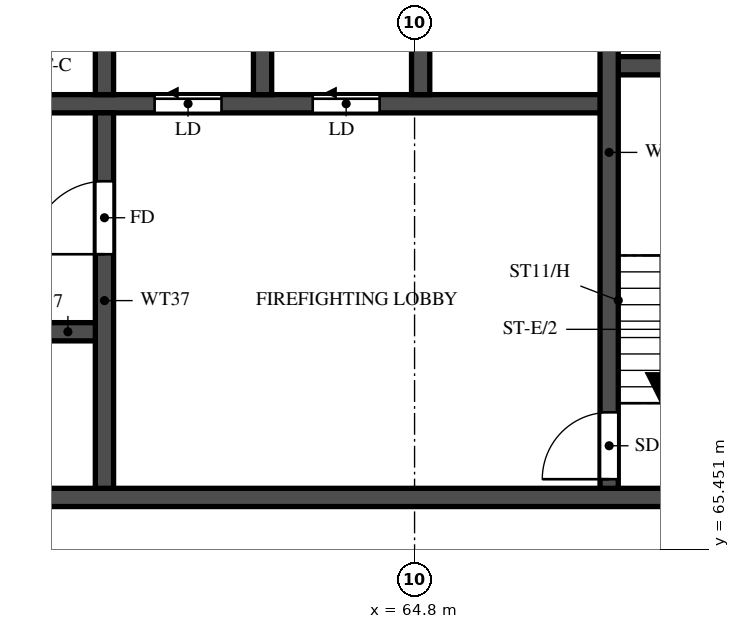
"""IFC4 building model, lengths in metres.
Left out: names, types, materials, properties, quantities, classifications, styles, units other than length and angle.
Written with IfcOpenShell. Run it as: python <this file> out.ifc"""

import sys

from ifc_helpers import new_model, si_unit, direction, frame, frame_2d, origin, place, context, subcontext, project, spatial, rectangle, extrude, element, fill, save


model = new_model("IFC4")
c1 = context("Model", 3, precision=1e-05, world=origin(), true_north=direction((0.0, 1.0)))
c2 = subcontext(c1, "Body", "Model", "MODEL_VIEW")
j1 = project(units=[si_unit("LENGTHUNIT", "METRE"), si_unit("PLANEANGLEUNIT", "RADIAN")], contexts=[c1])
p1 = place(None, origin())
s1 = spatial("IfcSite", under=j1, at=p1, CompositionType="ELEMENT")
p2 = place(p1, origin())
s2 = spatial("IfcBuilding", under=s1, at=p2, CompositionType="ELEMENT")
p3 = place(p2, frame((0.0, 0.0, 239.5)))
s3 = spatial("IfcBuildingStorey", under=s2, at=p3, CompositionType="ELEMENT", Elevation=239.5)
p4 = place(p3, frame((29.2, 66.3, 0.0), z_axis=(0.0, 0.0, 1.0), x_axis=(1.0, 0.0, 0.0)))
e1 = element("IfcWall", 1, at=p4, inside=s3, PredefinedType="SHEAR", context=c2, shape_type="SweptSolid", body=[
    extrude(rectangle(XDim=42.4, YDim=0.3, at=frame_2d((21.2, 0.0))), origin(), (0.0, 0.0, 1.0), 3.22),
])
p5 = place(p4, frame((1.425, 0.0, 0.0)))
e2 = element("IfcOpeningElement", 2, at=p5, cuts=e1, PredefinedType="OPENING", context=c2, shape_type="SweptSolid", body=[
    extrude(rectangle(XDim=1.1, YDim=2.1, at=frame_2d((0.55, 1.05))), frame((0.0, 0.16, 0.0), z_axis=(0.0, -1.0, 0.0), x_axis=(1.0, 0.0, 0.0)), (0.0, 0.0, 1.0), 0.32),
])
p6 = place(p4, frame((4.2, 0.0, 0.0)))
e3 = element("IfcOpeningElement", 3, at=p6, cuts=e1, PredefinedType="OPENING", context=c2, shape_type="SweptSolid", body=[
    extrude(rectangle(XDim=1.8, YDim=2.1, at=frame_2d((0.9, 1.05))), frame((0.0, 0.16, 0.0), z_axis=(0.0, -1.0, 0.0), x_axis=(1.0, 0.0, 0.0)), (0.0, 0.0, 1.0), 0.32),
])
p7 = place(p3, frame((35.65, 69.025, 0.0), z_axis=(0.0, 0.0, 1.0), x_axis=(1.0, 0.0, 0.0)))
e4 = element("IfcWall", 4, at=p7, inside=s3, PredefinedType="SHEAR", context=c2, shape_type="SweptSolid", body=[
    extrude(rectangle(XDim=24.05, YDim=0.3, at=frame_2d((12.025, 0.0))), origin(), (0.0, 0.0, 1.0), 3.22),
])
p8 = place(p7, frame((0.975, 0.0, 0.0)))
e5 = element("IfcOpeningElement", 5, at=p8, cuts=e4, PredefinedType="OPENING", context=c2, shape_type="SweptSolid", body=[
    extrude(rectangle(XDim=1.1, YDim=2.1, at=frame_2d((0.55, 1.05))), frame((0.0, 0.16, 0.0), z_axis=(0.0, -1.0, 0.0), x_axis=(1.0, 0.0, 0.0)), (0.0, 0.0, 1.0), 0.32),
])
p9 = place(p7, frame((3.725, 0.0, 0.0)))
e6 = element("IfcOpeningElement", 6, at=p9, cuts=e4, PredefinedType="OPENING", context=c2, shape_type="SweptSolid", body=[
    extrude(rectangle(XDim=1.1, YDim=2.1, at=frame_2d((0.55, 1.05))), frame((0.0, 0.16, 0.0), z_axis=(0.0, -1.0, 0.0), x_axis=(1.0, 0.0, 0.0)), (0.0, 0.0, 1.0), 0.32),
])
p10 = place(p7, frame((6.475, 0.0, 0.0)))
e7 = element("IfcOpeningElement", 7, at=p10, cuts=e4, PredefinedType="OPENING", context=c2, shape_type="SweptSolid", body=[
    extrude(rectangle(XDim=1.1, YDim=2.1, at=frame_2d((0.55, 1.05))), frame((0.0, 0.16, 0.0), z_axis=(0.0, -1.0, 0.0), x_axis=(1.0, 0.0, 0.0)), (0.0, 0.0, 1.0), 0.32),
])
p11 = place(p7, frame((9.225, 0.0, 0.0)))
e8 = element("IfcOpeningElement", 8, at=p11, cuts=e4, PredefinedType="OPENING", context=c2, shape_type="SweptSolid", body=[
    extrude(rectangle(XDim=1.1, YDim=2.1, at=frame_2d((0.55, 1.05))), frame((0.0, 0.16, 0.0), z_axis=(0.0, -1.0, 0.0), x_axis=(1.0, 0.0, 0.0)), (0.0, 0.0, 1.0), 0.32),
])
p12 = place(p7, frame((11.975, 0.0, 0.0)))
e9 = element("IfcOpeningElement", 9, at=p12, cuts=e4, PredefinedType="OPENING", context=c2, shape_type="SweptSolid", body=[
    extrude(rectangle(XDim=1.1, YDim=2.1, at=frame_2d((0.55, 1.05))), frame((0.0, 0.16, 0.0), z_axis=(0.0, -1.0, 0.0), x_axis=(1.0, 0.0, 0.0)), (0.0, 0.0, 1.0), 0.32),
])
p13 = place(p7, frame((14.725, 0.0, 0.0)))
e10 = element("IfcOpeningElement", 10, at=p13, cuts=e4, PredefinedType="OPENING", context=c2, shape_type="SweptSolid", body=[
    extrude(rectangle(XDim=1.1, YDim=2.1, at=frame_2d((0.55, 1.05))), frame((0.0, 0.16, 0.0), z_axis=(0.0, -1.0, 0.0), x_axis=(1.0, 0.0, 0.0)), (0.0, 0.0, 1.0), 0.32),
])
p14 = place(p7, frame((17.6, 0.0, 0.0)))
e11 = element("IfcOpeningElement", 11, at=p14, cuts=e4, PredefinedType="OPENING", context=c2, shape_type="SweptSolid", body=[
    extrude(rectangle(XDim=1.1, YDim=2.1, at=frame_2d((0.55, 1.05))), frame((0.0, 0.16, 0.0), z_axis=(0.0, -1.0, 0.0), x_axis=(1.0, 0.0, 0.0)), (0.0, 0.0, 1.0), 0.32),
])
p15 = place(p7, frame((20.6, 0.0, 0.0)))
e12 = element("IfcOpeningElement", 12, at=p15, cuts=e4, PredefinedType="OPENING", context=c2, shape_type="SweptSolid", body=[
    extrude(rectangle(XDim=1.1, YDim=2.1, at=frame_2d((0.55, 1.05))), frame((0.0, 0.16, 0.0), z_axis=(0.0, -1.0, 0.0), x_axis=(1.0, 0.0, 0.0)), (0.0, 0.0, 1.0), 0.32),
])
p16 = place(p3, frame((32.8, 72.775, 0.0), z_axis=(0.0, 0.0, 1.0), x_axis=(1.0, 0.0, 0.0)))
e13 = element("IfcWall", 13, at=p16, inside=s3, PredefinedType="SHEAR", context=c2, shape_type="SweptSolid", body=[
    extrude(rectangle(XDim=35.2, YDim=0.3, at=frame_2d((17.6, 0.0))), origin(), (0.0, 0.0, 1.0), 3.22),
])
p17 = place(p16, frame((19.8, 0.0, 0.0)))
e14 = element("IfcOpeningElement", 14, at=p17, cuts=e13, PredefinedType="OPENING", context=c2, shape_type="SweptSolid", body=[
    extrude(rectangle(XDim=1.1, YDim=2.1, at=frame_2d((0.55, 1.05))), frame((0.0, 0.16, 0.0), z_axis=(0.0, -1.0, 0.0), x_axis=(1.0, 0.0, 0.0)), (0.0, 0.0, 1.0), 0.32),
])
p18 = place(p16, frame((27.725, 0.0, 0.0)))
e15 = element("IfcOpeningElement", 15, at=p18, cuts=e13, PredefinedType="OPENING", context=c2, shape_type="SweptSolid", body=[
    extrude(rectangle(XDim=1.1, YDim=2.1, at=frame_2d((0.55, 1.05))), frame((0.0, 0.16, 0.0), z_axis=(0.0, -1.0, 0.0), x_axis=(1.0, 0.0, 0.0)), (0.0, 0.0, 1.0), 0.32),
])
p19 = place(p16, frame((30.325, 0.0, 0.0)))
e16 = element("IfcOpeningElement", 16, at=p19, cuts=e13, PredefinedType="OPENING", context=c2, shape_type="SweptSolid", body=[
    extrude(rectangle(XDim=1.1, YDim=2.1, at=frame_2d((0.55, 1.05))), frame((0.0, 0.16, 0.0), z_axis=(0.0, -1.0, 0.0), x_axis=(1.0, 0.0, 0.0)), (0.0, 0.0, 1.0), 0.32),
])
p20 = place(p16, frame((3.825, 0.0, 0.0)))
e17 = element("IfcOpeningElement", 17, at=p20, cuts=e13, PredefinedType="OPENING", context=c2, shape_type="SweptSolid", body=[
    extrude(rectangle(XDim=1.1, YDim=2.1, at=frame_2d((0.55, 1.05))), frame((0.0, 0.16, 0.0), z_axis=(0.0, -1.0, 0.0), x_axis=(1.0, 0.0, 0.0)), (0.0, 0.0, 1.0), 0.32),
])
p21 = place(p16, frame((6.575, 0.0, 0.0)))
e18 = element("IfcOpeningElement", 18, at=p21, cuts=e13, PredefinedType="OPENING", context=c2, shape_type="SweptSolid", body=[
    extrude(rectangle(XDim=1.1, YDim=2.1, at=frame_2d((0.55, 1.05))), frame((0.0, 0.16, 0.0), z_axis=(0.0, -1.0, 0.0), x_axis=(1.0, 0.0, 0.0)), (0.0, 0.0, 1.0), 0.32),
])
p22 = place(p16, frame((9.325, 0.0, 0.0)))
e19 = element("IfcOpeningElement", 19, at=p22, cuts=e13, PredefinedType="OPENING", context=c2, shape_type="SweptSolid", body=[
    extrude(rectangle(XDim=1.1, YDim=2.1, at=frame_2d((0.55, 1.05))), frame((0.0, 0.16, 0.0), z_axis=(0.0, -1.0, 0.0), x_axis=(1.0, 0.0, 0.0)), (0.0, 0.0, 1.0), 0.32),
])
p23 = place(p16, frame((12.075, 0.0, 0.0)))
e20 = element("IfcOpeningElement", 20, at=p23, cuts=e13, PredefinedType="OPENING", context=c2, shape_type="SweptSolid", body=[
    extrude(rectangle(XDim=1.1, YDim=2.1, at=frame_2d((0.55, 1.05))), frame((0.0, 0.16, 0.0), z_axis=(0.0, -1.0, 0.0), x_axis=(1.0, 0.0, 0.0)), (0.0, 0.0, 1.0), 0.32),
])
p24 = place(p16, frame((14.825, 0.0, 0.0)))
e21 = element("IfcOpeningElement", 21, at=p24, cuts=e13, PredefinedType="OPENING", context=c2, shape_type="SweptSolid", body=[
    extrude(rectangle(XDim=1.1, YDim=2.1, at=frame_2d((0.55, 1.05))), frame((0.0, 0.16, 0.0), z_axis=(0.0, -1.0, 0.0), x_axis=(1.0, 0.0, 0.0)), (0.0, 0.0, 1.0), 0.32),
])
p25 = place(p16, frame((17.575, 0.0, 0.0)))
e22 = element("IfcOpeningElement", 22, at=p25, cuts=e13, PredefinedType="OPENING", context=c2, shape_type="SweptSolid", body=[
    extrude(rectangle(XDim=1.1, YDim=2.1, at=frame_2d((0.55, 1.05))), frame((0.0, 0.16, 0.0), z_axis=(0.0, -1.0, 0.0), x_axis=(1.0, 0.0, 0.0)), (0.0, 0.0, 1.0), 0.32),
])
p26 = place(p16, frame((0.95, 0.0, 0.0)))
e23 = element("IfcOpeningElement", 23, at=p26, cuts=e13, PredefinedType="OPENING", context=c2, shape_type="SweptSolid", body=[
    extrude(rectangle(XDim=1.1, YDim=2.1, at=frame_2d((0.55, 1.05))), frame((0.0, 0.16, 0.0), z_axis=(0.0, -1.0, 0.0), x_axis=(1.0, 0.0, 0.0)), (0.0, 0.0, 1.0), 0.32),
])
p27 = place(p3, frame((68.0, 73.4, 0.0), z_axis=(0.0, 0.0, 1.0), x_axis=(1.0, 0.0, 0.0)))
e24 = element("IfcWall", 24, at=p27, inside=s3, PredefinedType="SHEAR", context=c2, shape_type="SweptSolid", body=[
    extrude(rectangle(XDim=3.1, YDim=0.3, at=frame_2d((1.55, 0.0))), origin(), (0.0, 0.0, 1.0), 3.22),
])
p28 = place(p3, frame((68.0, 66.45, 0.0), z_axis=(0.0, 0.0, 1.0), x_axis=(0.0, 1.0, 0.0)))
e25 = element("IfcWall", 25, at=p28, inside=s3, PredefinedType="SHEAR", context=c2, shape_type="SweptSolid", body=[
    extrude(rectangle(XDim=11.05, YDim=0.3, at=frame_2d((5.525, 0.0))), origin(), (0.0, 0.0, 1.0), 3.22),
])
p29 = place(p28, frame((0.15, 0.0, 0.0)))
e26 = element("IfcOpeningElement", 26, at=p29, cuts=e25, PredefinedType="OPENING", context=c2, shape_type="SweptSolid", body=[
    extrude(rectangle(XDim=1.1, YDim=2.1, at=frame_2d((0.55, 1.05))), frame((0.0, 0.16, 0.0), z_axis=(0.0, -1.0, 0.0), x_axis=(1.0, 0.0, 0.0)), (0.0, 0.0, 1.0), 0.32),
])
p30 = place(p3, frame((59.7, 66.45, 0.0), z_axis=(0.0, 0.0, 1.0), x_axis=(0.0, 1.0, 0.0)))
e27 = element("IfcWall", 27, at=p30, inside=s3, PredefinedType="SHEAR", context=c2, shape_type="SweptSolid", body=[
    extrude(rectangle(XDim=6.175, YDim=0.3, at=frame_2d((3.087, 0.0))), origin(), (0.0, 0.0, 1.0), 3.22),
])
p31 = place(p30, frame((3.85, 0.0, 0.0)))
e28 = element("IfcOpeningElement", 28, at=p31, cuts=e27, PredefinedType="OPENING", context=c2, shape_type="SweptSolid", body=[
    extrude(rectangle(XDim=1.2, YDim=2.1, at=frame_2d((0.6, 1.05))), frame((0.0, 0.16, 0.0), z_axis=(0.0, -1.0, 0.0), x_axis=(1.0, 0.0, 0.0)), (0.0, 0.0, 1.0), 0.32),
])
for number, where, z_axis, x_axis in (
    (29, (59.7, 72.925, 0.0), (0.0, 0.0, 1.0), (0.0, 1.0, 0.0)),
    (30, (62.3, 72.925, 0.0), (0.0, 0.0, 1.0), (0.0, 1.0, 0.0)),
    (31, (64.9, 72.925, 0.0), (0.0, 0.0, 1.0), (0.0, 1.0, 0.0)),
):
    element("IfcWall", number, at=place(p3, frame(where, z_axis=z_axis, x_axis=x_axis)), inside=s3, PredefinedType="SHEAR", context=c2, shape_type="SweptSolid", body=[
        extrude(rectangle(XDim=2.95, YDim=0.3, at=frame_2d((1.475, 0.0))), origin(), (0.0, 0.0, 1.0), 3.22),
    ])
p32 = place(p29, origin())
e32 = element("IfcDoor", 32, at=p32, inside=s3, OperationType="SINGLE_SWING_RIGHT", PredefinedType="DOOR", context=c2, shape_type="SweptSolid", body=[
    extrude(rectangle(XDim=1.1, YDim=2.1, at=frame_2d((0.55, 1.05))), frame((0.0, 0.025, 0.0), z_axis=(0.0, -1.0, 0.0), x_axis=(1.0, 0.0, 0.0)), (0.0, 0.0, 1.0), 0.05),
])
fill(e26, e32)
p33 = place(p31, origin())
e33 = element("IfcDoor", 33, at=p33, inside=s3, OperationType="SINGLE_SWING_LEFT", PredefinedType="DOOR", context=c2, shape_type="SweptSolid", body=[
    extrude(rectangle(XDim=1.2, YDim=2.1, at=frame_2d((0.6, 1.05))), frame((0.0, 0.025, 0.0), z_axis=(0.0, -1.0, 0.0), x_axis=(1.0, 0.0, 0.0)), (0.0, 0.0, 1.0), 0.05),
])
fill(e28, e33)
p34 = place(p18, origin())
e34 = element("IfcDoor", 34, at=p34, inside=s3, OperationType="SLIDING_TO_LEFT", PredefinedType="DOOR", context=c2, shape_type="SweptSolid", body=[
    extrude(rectangle(XDim=1.1, YDim=2.1, at=frame_2d((0.55, 1.05))), frame((0.0, 0.025, 0.0), z_axis=(0.0, -1.0, 0.0), x_axis=(1.0, 0.0, 0.0)), (0.0, 0.0, 1.0), 0.05),
])
fill(e15, e34)
p35 = place(p19, origin())
e35 = element("IfcDoor", 35, at=p35, inside=s3, OperationType="SLIDING_TO_LEFT", PredefinedType="DOOR", context=c2, shape_type="SweptSolid", body=[
    extrude(rectangle(XDim=1.1, YDim=2.1, at=frame_2d((0.55, 1.05))), frame((0.0, 0.025, 0.0), z_axis=(0.0, -1.0, 0.0), x_axis=(1.0, 0.0, 0.0)), (0.0, 0.0, 1.0), 0.05),
])
fill(e16, e35)
save(model, sys.argv[1])
